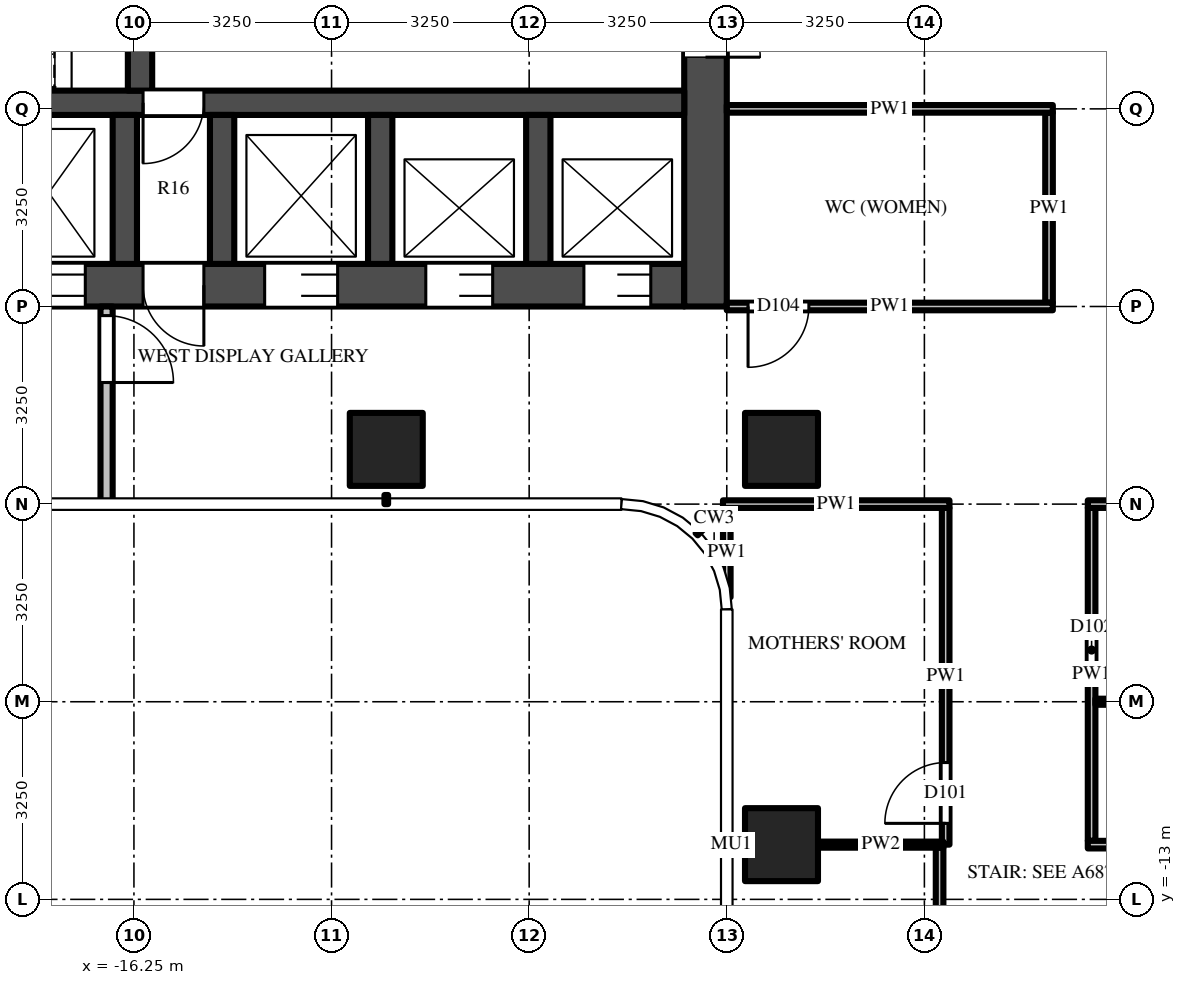
"""IFC4 building model, lengths in metres.
Left out: names, types, materials, properties, quantities, classifications, styles, units other than length and angle.
Written with IfcOpenShell. Run it as: python <this file> out.ifc"""

import sys

from ifc_helpers import new_model, si_unit, direction, frame, frame_2d, origin, origin_2d, place, context, subcontext, project, spatial, rectangle, extrude, source, transform, mapped, element, fill, save


model = new_model("IFC4")
c1 = context("Model", 3, precision=1e-05, world=origin(), true_north=direction((0.0, 1.0)))
c2 = subcontext(c1, "Body", "Model", "MODEL_VIEW")
j1 = project(units=[si_unit("LENGTHUNIT", "METRE"), si_unit("PLANEANGLEUNIT", "RADIAN")], contexts=[c1])
p1 = place(None, origin())
s1 = spatial("IfcSite", under=j1, at=p1, CompositionType="ELEMENT")
p2 = place(p1, origin())
s2 = spatial("IfcBuilding", under=s1, at=p2, CompositionType="ELEMENT")
p3 = place(p2, frame((0.0, 0.0, 193.2)))
s3 = spatial("IfcBuildingStorey", under=s2, at=p3, CompositionType="ELEMENT", Elevation=193.2)
m1 = source(origin(), c2, "Body", "SweptSolid", [
    extrude(rectangle(XDim=1.2, YDim=1.2, at=origin_2d()), origin(), (0.0, 0.0, 1.0), 3.9),
])
for number, where, z_axis, x_axis in (
    (1, (-5.6, -5.6, 0.0), (0.0, 0.0, 1.0), (1.0, 0.0, 0.0)),
    (2, (-5.6, -12.1, 0.0), (0.0, 0.0, 1.0), (1.0, 0.0, 0.0)),
    (3, (-12.1, -5.6, 0.0), (0.0, 0.0, 1.0), (1.0, 0.0, 0.0)),
):
    element("IfcColumn", number, at=place(p3, frame(where, z_axis=z_axis, x_axis=x_axis)), inside=s3, PredefinedType="COLUMN", context=c2, shape_type="MappedRepresentation", body=[
        mapped(m1, transform((0.0, 0.0, 0.0))),
    ])
m2 = source(origin(), c2, "Body", "SweptSolid", [
    extrude(rectangle(XDim=14.85, YDim=0.7, at=frame_2d((7.425, 0.0))), origin(), (0.0, 0.0, 1.0), 3.7),
])
p4 = place(p3, frame((-7.2, -2.9, 0.0), z_axis=(0.0, 0.0, 1.0), x_axis=(-1.0, 0.0, 0.0)))
e4 = element("IfcWall", 4, at=p4, inside=s3, PredefinedType="SHEAR", context=c2, shape_type="MappedRepresentation", body=[
    mapped(m2, transform((0.0, 0.0, 0.0))),
])
m3 = source(origin(), c2, "Body", "SweptSolid", [
    extrude(rectangle(XDim=1.1, YDim=2.1, at=frame_2d((0.55, 1.05))), frame((0.0, 0.36, 0.0), z_axis=(0.0, -1.0, 0.0), x_axis=(1.0, 0.0, 0.0)), (0.0, 0.0, 1.0), 0.72),
])
p5 = place(p4, frame((0.55, 0.0, 0.0)))
e5 = element("IfcOpeningElement", 5, at=p5, cuts=e4, PredefinedType="OPENING", context=c2, shape_type="MappedRepresentation", body=[
    mapped(m3, transform((0.0, 0.0, 0.0))),
])
p6 = place(p4, frame((3.15, 0.0, 0.0)))
e6 = element("IfcOpeningElement", 6, at=p6, cuts=e4, PredefinedType="OPENING", context=c2, shape_type="MappedRepresentation", body=[
    mapped(m3, transform((0.0, 0.0, 0.0))),
])
m4 = source(origin(), c2, "Body", "SweptSolid", [
    extrude(rectangle(XDim=1.2, YDim=2.1, at=frame_2d((0.6, 1.05))), frame((0.0, 0.36, 0.0), z_axis=(0.0, -1.0, 0.0), x_axis=(1.0, 0.0, 0.0)), (0.0, 0.0, 1.0), 0.72),
])
p7 = place(p4, frame((5.7, 0.0, 0.0)))
e7 = element("IfcOpeningElement", 7, at=p7, cuts=e4, PredefinedType="OPENING", context=c2, shape_type="MappedRepresentation", body=[
    mapped(m4, transform((0.0, 0.0, 0.0))),
])
m5 = source(origin(), c2, "Body", "SweptSolid", [
    extrude(rectangle(XDim=1.3, YDim=2.1, at=frame_2d((0.65, 1.05))), frame((0.0, 0.36, 0.0), z_axis=(0.0, -1.0, 0.0), x_axis=(1.0, 0.0, 0.0)), (0.0, 0.0, 1.0), 0.72),
])
p8 = place(p4, frame((12.2, 0.0, 0.0)))
e8 = element("IfcOpeningElement", 8, at=p8, cuts=e4, PredefinedType="OPENING", context=c2, shape_type="MappedRepresentation", body=[
    mapped(m5, transform((0.0, 0.0, 0.0))),
])
p9 = place(p4, frame((9.85, 0.0, 0.0)))
e9 = element("IfcOpeningElement", 9, at=p9, cuts=e4, PredefinedType="OPENING", context=c2, shape_type="MappedRepresentation", body=[
    mapped(m4, transform((0.0, 0.0, 0.0))),
])
m6 = source(origin(), c2, "Body", "SweptSolid", [
    extrude(rectangle(XDim=1.0, YDim=2.1, at=frame_2d((0.5, 1.05))), frame((0.0, 0.36, 0.0), z_axis=(0.0, -1.0, 0.0), x_axis=(1.0, 0.0, 0.0)), (0.0, 0.0, 1.0), 0.72),
])
p10 = place(p4, frame((7.9, 0.0, 0.0)))
e10 = element("IfcOpeningElement", 10, at=p10, cuts=e4, PredefinedType="OPENING", context=c2, shape_type="MappedRepresentation", body=[
    mapped(m6, transform((0.0, 0.0, 0.0))),
])
m7 = source(origin(), c2, "Body", "SweptSolid", [
    extrude(rectangle(XDim=9.05, YDim=0.7, at=frame_2d((4.525, 0.0))), origin(), (0.0, 0.0, 1.0), 3.7),
])
p11 = place(p3, frame((-6.85, 5.8, 0.0), z_axis=(0.0, 0.0, 1.0), x_axis=(0.0, -1.0, 0.0)))
e11 = element("IfcWall", 11, at=p11, inside=s3, PredefinedType="SHEAR", context=c2, shape_type="MappedRepresentation", body=[
    mapped(m7, transform((0.0, 0.0, 0.0))),
])
m8 = source(origin(), c2, "Body", "SweptSolid", [
    extrude(rectangle(XDim=1.8, YDim=2.1, at=frame_2d((0.9, 1.05))), frame((0.0, 0.36, 0.0), z_axis=(0.0, -1.0, 0.0), x_axis=(1.0, 0.0, 0.0)), (0.0, 0.0, 1.0), 0.72),
])
p12 = place(p11, frame((3.15, 0.0, 0.0)))
e12 = element("IfcOpeningElement", 12, at=p12, cuts=e11, PredefinedType="OPENING", context=c2, shape_type="MappedRepresentation", body=[
    mapped(m8, transform((0.0, 0.0, 0.0))),
])
m9 = source(origin(), c2, "Body", "SweptSolid", [
    extrude(rectangle(XDim=14.85, YDim=0.4, at=frame_2d((7.425, 0.0))), origin(), (0.0, 0.0, 1.0), 3.7),
])
p13 = place(p3, frame((-7.2, 0.1, 0.0), z_axis=(0.0, 0.0, 1.0), x_axis=(-1.0, 0.0, 0.0)))
e13 = element("IfcWall", 13, at=p13, inside=s3, PredefinedType="SHEAR", context=c2, shape_type="MappedRepresentation", body=[
    mapped(m9, transform((0.0, 0.0, 0.0))),
])
m10 = source(origin(), c2, "Body", "SweptSolid", [
    extrude(rectangle(XDim=1.0, YDim=2.1, at=frame_2d((0.5, 1.05))), frame((0.0, 0.21, 0.0), z_axis=(0.0, -1.0, 0.0), x_axis=(1.0, 0.0, 0.0)), (0.0, 0.0, 1.0), 0.42),
])
p14 = place(p13, frame((7.9, 0.0, 0.0)))
e14 = element("IfcOpeningElement", 14, at=p14, cuts=e13, PredefinedType="OPENING", context=c2, shape_type="MappedRepresentation", body=[
    mapped(m10, transform((0.0, 0.0, 0.0))),
])
m11 = source(origin(), c2, "Body", "SweptSolid", [
    extrude(rectangle(XDim=5.5, YDim=0.4, at=frame_2d((2.75, 0.0))), origin(), (0.0, 0.0, 1.0), 3.7),
])
p15 = place(p3, frame((-16.15, 5.8, 0.0), z_axis=(0.0, 0.0, 1.0), x_axis=(0.0, -1.0, 0.0)))
e15 = element("IfcWall", 15, at=p15, inside=s3, PredefinedType="SHEAR", context=c2, shape_type="MappedRepresentation", body=[
    mapped(m11, transform((0.0, 0.0, 0.0))),
])
m12 = source(origin(), c2, "Body", "SweptSolid", [
    extrude(rectangle(XDim=1.1, YDim=2.1, at=frame_2d((0.55, 1.05))), frame((0.0, 0.21, 0.0), z_axis=(0.0, -1.0, 0.0), x_axis=(1.0, 0.0, 0.0)), (0.0, 0.0, 1.0), 0.42),
])
p16 = place(p15, frame((0.725, 0.0, 0.0)))
e16 = element("IfcOpeningElement", 16, at=p16, cuts=e15, PredefinedType="OPENING", context=c2, shape_type="MappedRepresentation", body=[
    mapped(m12, transform((0.0, 0.0, 0.0))),
])
p17 = place(p15, frame((3.675, 0.0, 0.0)))
e17 = element("IfcOpeningElement", 17, at=p17, cuts=e15, PredefinedType="OPENING", context=c2, shape_type="MappedRepresentation", body=[
    mapped(m12, transform((0.0, 0.0, 0.0))),
])
m13 = source(origin(), c2, "Body", "SweptSolid", [
    extrude(rectangle(XDim=2.45, YDim=0.4, at=frame_2d((1.225, 0.0))), origin(), (0.0, 0.0, 1.0), 3.7),
])
for number, where, z_axis, x_axis in (
    (18, (-9.6, -0.1, 0.0), (0.0, 0.0, 1.0), (0.0, -1.0, 0.0)),
    (19, (-12.2, -0.1, 0.0), (0.0, 0.0, 1.0), (0.0, -1.0, 0.0)),
    (20, (-14.8, -0.1, 0.0), (0.0, 0.0, 1.0), (0.0, -1.0, 0.0)),
    (21, (-16.4, -0.1, 0.0), (0.0, 0.0, 1.0), (0.0, -1.0, 0.0)),
):
    element("IfcWall", number, at=place(p3, frame(where, z_axis=z_axis, x_axis=x_axis)), inside=s3, PredefinedType="SHEAR", context=c2, shape_type="MappedRepresentation", body=[
        mapped(m13, transform((0.0, 0.0, 0.0))),
    ])
m14 = source(origin(), c2, "Body", "SweptSolid", [
    extrude(rectangle(XDim=3.25, YDim=0.2, at=frame_2d((1.625, 0.0))), origin(), (0.0, 0.0, 1.0), 3.7),
])
p18 = place(p3, frame((-16.7, -3.25, 0.0), z_axis=(0.0, 0.0, 1.0), x_axis=(0.0, -1.0, 0.0)))
e22 = element("IfcWall", 22, at=p18, inside=s3, PredefinedType="PARTITIONING", context=c2, shape_type="MappedRepresentation", body=[
    mapped(m14, transform((0.0, 0.0, 0.0))),
])
m15 = source(origin(), c2, "Body", "SweptSolid", [
    extrude(rectangle(XDim=1.1, YDim=2.1, at=frame_2d((0.55, 1.05))), frame((0.0, 0.11, 0.0), z_axis=(0.0, -1.0, 0.0), x_axis=(1.0, 0.0, 0.0)), (0.0, 0.0, 1.0), 0.22),
])
p19 = place(p18, frame((0.15, 0.0, 0.0)))
e23 = element("IfcOpeningElement", 23, at=p19, cuts=e22, PredefinedType="OPENING", context=c2, shape_type="MappedRepresentation", body=[
    mapped(m15, transform((0.0, 0.0, 0.0))),
])
m16 = source(origin(), c2, "Body", "SweptSolid", [
    extrude(rectangle(XDim=1.469, YDim=0.125, at=frame_2d((0.734, 0.0))), origin(), (0.0, 0.0, 1.0), 3.7),
])
p20 = place(p3, frame((-6.5, -6.562, 0.0), z_axis=(0.0, 0.0, 1.0), x_axis=(0.0, -1.0, 0.0)))
e24 = element("IfcWall", 24, at=p20, inside=s3, PredefinedType="PARTITIONING", context=c2, shape_type="MappedRepresentation", body=[
    mapped(m16, transform((0.0, 0.0, 0.0))),
])
m17 = source(origin(), c2, "Body", "SweptSolid", [
    extrude(rectangle(XDim=8.85, YDim=0.125, at=frame_2d((4.425, 0.0))), origin(), (0.0, 0.0, 1.0), 2.997),
])
p21 = place(p3, frame((-3.0, -21.0, 0.0), z_axis=(0.0, 0.0, 1.0), x_axis=(0.0, 1.0, 0.0)))
e25 = element("IfcWall", 25, at=p21, inside=s3, PredefinedType="PARTITIONING", context=c2, shape_type="MappedRepresentation", body=[
    mapped(m17, transform((0.0, 0.0, 0.0))),
])
m18 = source(origin(), c2, "Body", "SweptSolid", [
    extrude(rectangle(XDim=1.8, YDim=2.1, at=frame_2d((0.9, 1.05))), frame((0.0, 0.073, 0.0), z_axis=(0.0, -1.0, 0.0), x_axis=(1.0, 0.0, 0.0)), (0.0, 0.0, 1.0), 0.145),
])
p22 = place(p21, frame((5.35, 0.0, 0.0)))
e26 = element("IfcOpeningElement", 26, at=p22, cuts=e25, PredefinedType="OPENING", context=c2, shape_type="MappedRepresentation", body=[
    mapped(m18, transform((0.0, 0.0, 0.0))),
])
m19 = source(origin(), c2, "Body", "SweptSolid", [
    extrude(rectangle(XDim=5.538, YDim=0.125, at=frame_2d((2.769, 0.0))), origin(), (0.0, 0.0, 1.0), 2.997),
])
p23 = place(p3, frame((-2.9, -12.1, 0.0), z_axis=(0.0, 0.0, 1.0), x_axis=(0.0, 1.0, 0.0)))
e27 = element("IfcWall", 27, at=p23, inside=s3, PredefinedType="PARTITIONING", context=c2, shape_type="MappedRepresentation", body=[
    mapped(m19, transform((0.0, 0.0, 0.0))),
])
m20 = source(origin(), c2, "Body", "SweptSolid", [
    extrude(rectangle(XDim=1.0, YDim=2.1, at=frame_2d((0.5, 1.05))), frame((0.0, 0.073, 0.0), z_axis=(0.0, -1.0, 0.0), x_axis=(1.0, 0.0, 0.0)), (0.0, 0.0, 1.0), 0.145),
])
p24 = place(p23, frame((0.35, 0.0, 0.0)))
e28 = element("IfcOpeningElement", 28, at=p24, cuts=e27, PredefinedType="OPENING", context=c2, shape_type="MappedRepresentation", body=[
    mapped(m20, transform((0.0, 0.0, 0.0))),
])
m21 = source(origin(), c2, "Body", "SweptSolid", [
    extrude(rectangle(XDim=3.125, YDim=0.125, at=frame_2d((1.562, 0.0))), origin(), (0.0, 0.0, 1.0), 3.068),
])
p25 = place(p3, frame((-1.2, -0.062, 0.0), z_axis=(0.0, 0.0, 1.0), x_axis=(0.0, -1.0, 0.0)))
e29 = element("IfcWall", 29, at=p25, inside=s3, PredefinedType="PARTITIONING", context=c2, shape_type="MappedRepresentation", body=[
    mapped(m21, transform((0.0, 0.0, 0.0))),
])
m22 = source(origin(), c2, "Body", "SweptSolid", [
    extrude(rectangle(XDim=5.475, YDim=0.125, at=frame_2d((2.738, 0.0))), origin(), (0.0, 0.0, 1.0), 2.997),
])
p26 = place(p3, frame((-0.5, -6.562, 0.0), z_axis=(0.0, 0.0, 1.0), x_axis=(0.0, -1.0, 0.0)))
e30 = element("IfcWall", 30, at=p26, inside=s3, PredefinedType="PARTITIONING", context=c2, shape_type="MappedRepresentation", body=[
    mapped(m22, transform((0.0, 0.0, 0.0))),
])
p27 = place(p26, frame((1.837, 0.0, 0.0)))
e31 = element("IfcOpeningElement", 31, at=p27, cuts=e30, PredefinedType="OPENING", context=c2, shape_type="MappedRepresentation", body=[
    mapped(m20, transform((0.0, 0.0, 0.0))),
])
m23 = source(origin(), c2, "Body", "SweptSolid", [
    extrude(rectangle(XDim=2.062, YDim=0.1, at=frame_2d((1.031, 0.0))), origin(), (0.0, 0.0, 1.0), 2.997),
])
p28 = place(p3, frame((-5.0, -12.1, 0.0), z_axis=(0.0, 0.0, 1.0), x_axis=(1.0, 0.0, 0.0)))
e32 = element("IfcWall", 32, at=p28, inside=s3, PredefinedType="PARTITIONING", context=c2, shape_type="MappedRepresentation", body=[
    mapped(m23, transform((0.0, 0.0, 0.0))),
])
m24 = source(origin(), c2, "Body", "SweptSolid", [
    extrude(rectangle(XDim=3.625, YDim=0.125, at=frame_2d((1.812, 0.0))), origin(), (0.0, 0.0, 1.0), 2.997),
])
p29 = place(p3, frame((-0.562, -12.1, 0.0), z_axis=(0.0, 0.0, 1.0), x_axis=(1.0, 0.0, 0.0)))
e33 = element("IfcWall", 33, at=p29, inside=s3, PredefinedType="PARTITIONING", context=c2, shape_type="MappedRepresentation", body=[
    mapped(m24, transform((0.0, 0.0, 0.0))),
])
m25 = source(origin(), c2, "Body", "SweptSolid", [
    extrude(rectangle(XDim=6.738, YDim=0.1, at=frame_2d((3.369, 0.0))), origin(), (0.0, 0.0, 1.0), 2.78),
])
p30 = place(p3, frame((-0.438, -9.75, 0.0), z_axis=(0.0, 0.0, 1.0), x_axis=(1.0, 0.0, 0.0)))
e34 = element("IfcWall", 34, at=p30, inside=s3, PredefinedType="PARTITIONING", context=c2, shape_type="MappedRepresentation", body=[
    mapped(m25, transform((0.0, 0.0, 0.0))),
])
m26 = source(origin(), c2, "Body", "SweptSolid", [
    extrude(rectangle(XDim=3.725, YDim=0.125, at=frame_2d((1.863, 0.0))), origin(), (0.0, 0.0, 1.0), 2.78),
])
p31 = place(p3, frame((-2.837, -6.5, 0.0), z_axis=(0.0, 0.0, 1.0), x_axis=(-1.0, 0.0, 0.0)))
e35 = element("IfcWall", 35, at=p31, inside=s3, PredefinedType="PARTITIONING", context=c2, shape_type="MappedRepresentation", body=[
    mapped(m26, transform((0.0, 0.0, 0.0))),
])
m27 = source(origin(), c2, "Body", "SweptSolid", [
    extrude(rectangle(XDim=1.825, YDim=0.125, at=frame_2d((0.913, 0.0))), origin(), (0.0, 0.0, 1.0), 3.7),
])
p32 = place(p3, frame((1.262, -6.5, 0.0), z_axis=(0.0, 0.0, 1.0), x_axis=(-1.0, 0.0, 0.0)))
e36 = element("IfcWall", 36, at=p32, inside=s3, PredefinedType="PARTITIONING", context=c2, shape_type="MappedRepresentation", body=[
    mapped(m27, transform((0.0, 0.0, 0.0))),
])
m28 = source(origin(), c2, "Body", "SweptSolid", [
    extrude(rectangle(XDim=5.363, YDim=0.125, at=frame_2d((2.681, 0.0))), origin(), (0.0, 0.0, 1.0), 2.997),
])
p33 = place(p3, frame((-1.137, -3.25, 0.0), z_axis=(0.0, 0.0, 1.0), x_axis=(-1.0, 0.0, 0.0)))
e37 = element("IfcWall", 37, at=p33, inside=s3, PredefinedType="PARTITIONING", context=c2, shape_type="MappedRepresentation", body=[
    mapped(m28, transform((0.0, 0.0, 0.0))),
])
p34 = place(p33, frame((4.012, 0.0, 0.0)))
e38 = element("IfcOpeningElement", 38, at=p34, cuts=e37, PredefinedType="OPENING", context=c2, shape_type="MappedRepresentation", body=[
    mapped(m20, transform((0.0, 0.0, 0.0))),
])
p35 = place(p3, frame((-1.137, 0.0, 0.0), z_axis=(0.0, 0.0, 1.0), x_axis=(-1.0, 0.0, 0.0)))
e39 = element("IfcWall", 39, at=p35, inside=s3, PredefinedType="PARTITIONING", context=c2, shape_type="MappedRepresentation", body=[
    mapped(m28, transform((0.0, 0.0, 0.0))),
])
m29 = source(origin(), c2, "Body", "SweptSolid", [
    extrude(rectangle(XDim=1.1, YDim=2.1, at=frame_2d((0.55, 1.05))), frame((0.0, -0.275, 0.0), z_axis=(0.0, -1.0, 0.0), x_axis=(1.0, 0.0, 0.0)), (0.0, 0.0, 1.0), 0.05),
])
p36 = place(p5, origin())
e40 = element("IfcDoor", 40, at=p36, inside=s3, OperationType="DOUBLE_DOOR_SLIDING", PredefinedType="DOOR", context=c2, shape_type="MappedRepresentation", body=[
    mapped(m29, transform((0.0, 0.0, 0.0))),
])
fill(e5, e40)
p37 = place(p6, origin())
e41 = element("IfcDoor", 41, at=p37, inside=s3, OperationType="DOUBLE_DOOR_SLIDING", PredefinedType="DOOR", context=c2, shape_type="MappedRepresentation", body=[
    mapped(m29, transform((0.0, 0.0, 0.0))),
])
fill(e6, e41)
m30 = source(origin(), c2, "Body", "SweptSolid", [
    extrude(rectangle(XDim=1.2, YDim=2.1, at=frame_2d((0.6, 1.05))), frame((0.0, -0.275, 0.0), z_axis=(0.0, -1.0, 0.0), x_axis=(1.0, 0.0, 0.0)), (0.0, 0.0, 1.0), 0.05),
])
p38 = place(p7, origin())
e42 = element("IfcDoor", 42, at=p38, inside=s3, OperationType="DOUBLE_DOOR_SLIDING", PredefinedType="DOOR", context=c2, shape_type="MappedRepresentation", body=[
    mapped(m30, transform((0.0, 0.0, 0.0))),
])
fill(e7, e42)
p39 = place(p9, origin())
e43 = element("IfcDoor", 43, at=p39, inside=s3, OperationType="DOUBLE_DOOR_SLIDING", PredefinedType="DOOR", context=c2, shape_type="MappedRepresentation", body=[
    mapped(m30, transform((0.0, 0.0, 0.0))),
])
fill(e9, e43)
m31 = source(origin(), c2, "Body", "SweptSolid", [
    extrude(rectangle(XDim=1.8, YDim=2.1, at=frame_2d((0.9, 1.05))), frame((0.0, -0.275, 0.0), z_axis=(0.0, -1.0, 0.0), x_axis=(1.0, 0.0, 0.0)), (0.0, 0.0, 1.0), 0.05),
])
p40 = place(p12, origin())
e44 = element("IfcDoor", 44, at=p40, inside=s3, OperationType="DOUBLE_DOOR_SINGLE_SWING", PredefinedType="DOOR", context=c2, shape_type="MappedRepresentation", body=[
    mapped(m31, transform((0.0, 0.0, 0.0))),
])
fill(e12, e44)
m32 = source(origin(), c2, "Body", "SweptSolid", [
    extrude(rectangle(XDim=1.0, YDim=2.1, at=frame_2d((0.5, 1.05))), frame((0.0, 0.025, 0.0), z_axis=(0.0, -1.0, 0.0), x_axis=(1.0, 0.0, 0.0)), (0.0, 0.0, 1.0), 0.05),
])
p41 = place(p14, origin())
e45 = element("IfcDoor", 45, at=p41, inside=s3, OperationType="SINGLE_SWING_RIGHT", PredefinedType="DOOR", context=c2, shape_type="MappedRepresentation", body=[
    mapped(m32, transform((0.0, 0.0, 0.0))),
])
fill(e14, e45)
m33 = source(origin(), c2, "Body", "SweptSolid", [
    extrude(rectangle(XDim=1.0, YDim=2.1, at=frame_2d((0.5, 1.05))), frame((0.0, -0.275, 0.0), z_axis=(0.0, -1.0, 0.0), x_axis=(1.0, 0.0, 0.0)), (0.0, 0.0, 1.0), 0.05),
])
p42 = place(p10, origin())
e46 = element("IfcDoor", 46, at=p42, inside=s3, OperationType="SINGLE_SWING_LEFT", PredefinedType="DOOR", context=c2, shape_type="MappedRepresentation", body=[
    mapped(m33, transform((0.0, 0.0, 0.0))),
])
fill(e10, e46)
m34 = source(origin(), c2, "Body", "SweptSolid", [
    extrude(rectangle(XDim=1.1, YDim=2.1, at=frame_2d((0.55, 1.05))), frame((0.0, 0.025, 0.0), z_axis=(0.0, -1.0, 0.0), x_axis=(1.0, 0.0, 0.0)), (0.0, 0.0, 1.0), 0.05),
])
p43 = place(p19, origin())
e47 = element("IfcDoor", 47, at=p43, inside=s3, OperationType="SINGLE_SWING_RIGHT", PredefinedType="DOOR", context=c2, shape_type="MappedRepresentation", body=[
    mapped(m34, transform((0.0, 0.0, 0.0))),
])
fill(e23, e47)
p44 = place(p24, origin())
e48 = element("IfcDoor", 48, at=p44, inside=s3, OperationType="SINGLE_SWING_LEFT", PredefinedType="DOOR", context=c2, shape_type="MappedRepresentation", body=[
    mapped(m32, transform((0.0, 0.0, 0.0))),
])
fill(e28, e48)
p45 = place(p27, origin())
e49 = element("IfcDoor", 49, at=p45, inside=s3, OperationType="SINGLE_SWING_RIGHT", PredefinedType="DOOR", context=c2, shape_type="MappedRepresentation", body=[
    mapped(m32, transform((0.0, 0.0, 0.0))),
])
fill(e31, e49)
p46 = place(p34, origin())
e50 = element("IfcDoor", 50, at=p46, inside=s3, OperationType="SINGLE_SWING_RIGHT", PredefinedType="DOOR", context=c2, shape_type="MappedRepresentation", body=[
    mapped(m32, transform((0.0, 0.0, 0.0))),
])
fill(e38, e50)
save(model, sys.argv[1])
